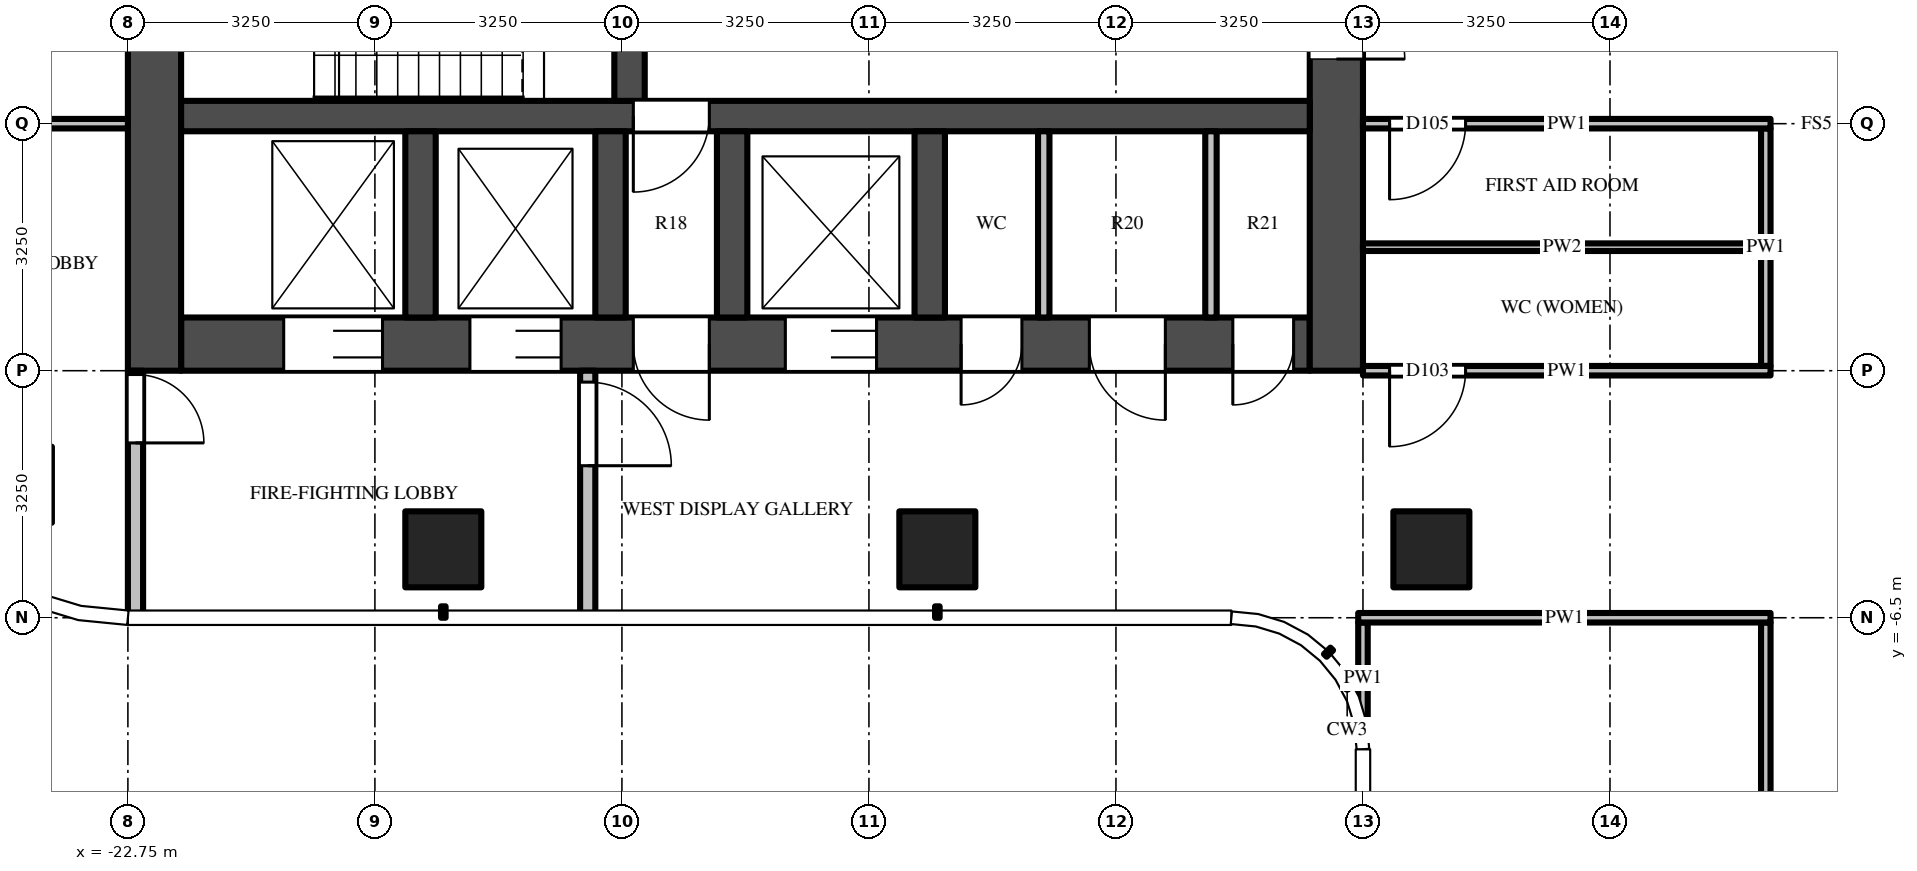
"""IFC4 building model, lengths in metres.
Left out: names, types, materials, properties, quantities, classifications, styles, units other than length and angle.
Written with IfcOpenShell. Run it as: python <this file> out.ifc"""

import sys

from ifc_helpers import new_model, si_unit, direction, frame, frame_2d, origin, origin_2d, place, context, subcontext, project, spatial, rectangle, extrude, source, transform, mapped, element, fill, save


model = new_model("IFC4")
c1 = context("Model", 3, precision=1e-05, world=origin(), true_north=direction((0.0, 1.0)))
c2 = subcontext(c1, "Body", "Model", "MODEL_VIEW")
j1 = project(units=[si_unit("LENGTHUNIT", "METRE"), si_unit("PLANEANGLEUNIT", "RADIAN")], contexts=[c1])
p1 = place(None, origin())
s1 = spatial("IfcSite", under=j1, at=p1, CompositionType="ELEMENT")
p2 = place(p1, origin())
s2 = spatial("IfcBuilding", under=s1, at=p2, CompositionType="ELEMENT")
p3 = place(p2, frame((0.0, 0.0, 291.1)))
s3 = spatial("IfcBuildingStorey", under=s2, at=p3, CompositionType="ELEMENT", Elevation=291.1)
m1 = source(origin(), c2, "Body", "SweptSolid", [
    extrude(rectangle(XDim=1.0, YDim=1.0, at=origin_2d()), origin(), (0.0, 0.0, 1.0), 3.9),
])
for number, where, z_axis, x_axis in (
    (1, (-5.6, -5.6, 0.0), (0.0, 0.0, 1.0), (1.0, 0.0, 0.0)),
    (2, (-12.1, -5.6, 0.0), (0.0, 0.0, 1.0), (1.0, 0.0, 0.0)),
    (3, (-18.6, -5.6, 0.0), (0.0, 0.0, 1.0), (1.0, 0.0, 0.0)),
):
    element("IfcColumn", number, at=place(p3, frame(where, z_axis=z_axis, x_axis=x_axis)), inside=s3, PredefinedType="COLUMN", context=c2, shape_type="MappedRepresentation", body=[
        mapped(m1, transform((0.0, 0.0, 0.0))),
    ])
m2 = source(origin(), c2, "Body", "SweptSolid", [
    extrude(rectangle(XDim=14.85, YDim=0.7, at=frame_2d((7.425, 0.0))), origin(), (0.0, 0.0, 1.0), 3.7),
])
p4 = place(p3, frame((-7.2, -2.9, 0.0), z_axis=(0.0, 0.0, 1.0), x_axis=(-1.0, 0.0, 0.0)))
e4 = element("IfcWall", 4, at=p4, inside=s3, PredefinedType="SHEAR", context=c2, shape_type="MappedRepresentation", body=[
    mapped(m2, transform((0.0, 0.0, 0.0))),
])
m3 = source(origin(), c2, "Body", "SweptSolid", [
    extrude(rectangle(XDim=1.2, YDim=2.1, at=frame_2d((0.6, 1.05))), frame((0.0, 0.36, 0.0), z_axis=(0.0, -1.0, 0.0), x_axis=(1.0, 0.0, 0.0)), (0.0, 0.0, 1.0), 0.72),
])
p5 = place(p4, frame((5.7, 0.0, 0.0)))
e5 = element("IfcOpeningElement", 5, at=p5, cuts=e4, PredefinedType="OPENING", context=c2, shape_type="MappedRepresentation", body=[
    mapped(m3, transform((0.0, 0.0, 0.0))),
])
m4 = source(origin(), c2, "Body", "SweptSolid", [
    extrude(rectangle(XDim=1.3, YDim=2.1, at=frame_2d((0.65, 1.05))), frame((0.0, 0.36, 0.0), z_axis=(0.0, -1.0, 0.0), x_axis=(1.0, 0.0, 0.0)), (0.0, 0.0, 1.0), 0.72),
])
p6 = place(p4, frame((12.2, 0.0, 0.0)))
e6 = element("IfcOpeningElement", 6, at=p6, cuts=e4, PredefinedType="OPENING", context=c2, shape_type="MappedRepresentation", body=[
    mapped(m4, transform((0.0, 0.0, 0.0))),
])
p7 = place(p4, frame((9.85, 0.0, 0.0)))
e7 = element("IfcOpeningElement", 7, at=p7, cuts=e4, PredefinedType="OPENING", context=c2, shape_type="MappedRepresentation", body=[
    mapped(m3, transform((0.0, 0.0, 0.0))),
])
m5 = source(origin(), c2, "Body", "SweptSolid", [
    extrude(rectangle(XDim=1.0, YDim=2.1, at=frame_2d((0.5, 1.05))), frame((0.0, 0.36, 0.0), z_axis=(0.0, -1.0, 0.0), x_axis=(1.0, 0.0, 0.0)), (0.0, 0.0, 1.0), 0.72),
])
p8 = place(p4, frame((7.9, 0.0, 0.0)))
e8 = element("IfcOpeningElement", 8, at=p8, cuts=e4, PredefinedType="OPENING", context=c2, shape_type="MappedRepresentation", body=[
    mapped(m5, transform((0.0, 0.0, 0.0))),
])
m6 = source(origin(), c2, "Body", "SweptSolid", [
    extrude(rectangle(XDim=0.8, YDim=2.1, at=frame_2d((0.4, 1.05))), frame((0.0, 0.36, 0.0), z_axis=(0.0, -1.0, 0.0), x_axis=(1.0, 0.0, 0.0)), (0.0, 0.0, 1.0), 0.72),
])
p9 = place(p4, frame((0.212, 0.0, 0.0)))
e9 = element("IfcOpeningElement", 9, at=p9, cuts=e4, PredefinedType="OPENING", context=c2, shape_type="MappedRepresentation", body=[
    mapped(m6, transform((0.0, 0.0, 0.0))),
])
p10 = place(p4, frame((1.9, 0.0, 0.0)))
e10 = element("IfcOpeningElement", 10, at=p10, cuts=e4, PredefinedType="OPENING", context=c2, shape_type="MappedRepresentation", body=[
    mapped(m5, transform((0.0, 0.0, 0.0))),
])
p11 = place(p4, frame((3.788, 0.0, 0.0)))
e11 = element("IfcOpeningElement", 11, at=p11, cuts=e4, PredefinedType="OPENING", context=c2, shape_type="MappedRepresentation", body=[
    mapped(m6, transform((0.0, 0.0, 0.0))),
])
m7 = source(origin(), c2, "Body", "SweptSolid", [
    extrude(rectangle(XDim=9.05, YDim=0.7, at=frame_2d((4.525, 0.0))), origin(), (0.0, 0.0, 1.0), 3.7),
])
p12 = place(p3, frame((-6.85, 5.8, 0.0), z_axis=(0.0, 0.0, 1.0), x_axis=(0.0, -1.0, 0.0)))
e12 = element("IfcWall", 12, at=p12, inside=s3, PredefinedType="SHEAR", context=c2, shape_type="MappedRepresentation", body=[
    mapped(m7, transform((0.0, 0.0, 0.0))),
])
m8 = source(origin(), c2, "Body", "SweptSolid", [
    extrude(rectangle(XDim=1.8, YDim=2.1, at=frame_2d((0.9, 1.05))), frame((0.0, 0.36, 0.0), z_axis=(0.0, -1.0, 0.0), x_axis=(1.0, 0.0, 0.0)), (0.0, 0.0, 1.0), 0.72),
])
p13 = place(p12, frame((3.15, 0.0, 0.0)))
e13 = element("IfcOpeningElement", 13, at=p13, cuts=e12, PredefinedType="OPENING", context=c2, shape_type="MappedRepresentation", body=[
    mapped(m8, transform((0.0, 0.0, 0.0))),
])
p14 = place(p3, frame((-22.4, 5.8, 0.0), z_axis=(0.0, 0.0, 1.0), x_axis=(0.0, -1.0, 0.0)))
e14 = element("IfcWall", 14, at=p14, inside=s3, PredefinedType="SHEAR", context=c2, shape_type="MappedRepresentation", body=[
    mapped(m7, transform((0.0, 0.0, 0.0))),
])
m9 = source(origin(), c2, "Body", "SweptSolid", [
    extrude(rectangle(XDim=14.85, YDim=0.4, at=frame_2d((7.425, 0.0))), origin(), (0.0, 0.0, 1.0), 3.7),
])
p15 = place(p3, frame((-7.2, 0.1, 0.0), z_axis=(0.0, 0.0, 1.0), x_axis=(-1.0, 0.0, 0.0)))
e15 = element("IfcWall", 15, at=p15, inside=s3, PredefinedType="SHEAR", context=c2, shape_type="MappedRepresentation", body=[
    mapped(m9, transform((0.0, 0.0, 0.0))),
])
m10 = source(origin(), c2, "Body", "SweptSolid", [
    extrude(rectangle(XDim=1.0, YDim=2.1, at=frame_2d((0.5, 1.05))), frame((0.0, 0.21, 0.0), z_axis=(0.0, -1.0, 0.0), x_axis=(1.0, 0.0, 0.0)), (0.0, 0.0, 1.0), 0.42),
])
p16 = place(p15, frame((7.9, 0.0, 0.0)))
e16 = element("IfcOpeningElement", 16, at=p16, cuts=e15, PredefinedType="OPENING", context=c2, shape_type="MappedRepresentation", body=[
    mapped(m10, transform((0.0, 0.0, 0.0))),
])
m11 = source(origin(), c2, "Body", "SweptSolid", [
    extrude(rectangle(XDim=5.5, YDim=0.4, at=frame_2d((2.75, 0.0))), origin(), (0.0, 0.0, 1.0), 3.7),
])
p17 = place(p3, frame((-16.15, 5.8, 0.0), z_axis=(0.0, 0.0, 1.0), x_axis=(0.0, -1.0, 0.0)))
e17 = element("IfcWall", 17, at=p17, inside=s3, PredefinedType="SHEAR", context=c2, shape_type="MappedRepresentation", body=[
    mapped(m11, transform((0.0, 0.0, 0.0))),
])
m12 = source(origin(), c2, "Body", "SweptSolid", [
    extrude(rectangle(XDim=1.1, YDim=2.1, at=frame_2d((0.55, 1.05))), frame((0.0, 0.21, 0.0), z_axis=(0.0, -1.0, 0.0), x_axis=(1.0, 0.0, 0.0)), (0.0, 0.0, 1.0), 0.42),
])
p18 = place(p17, frame((0.725, 0.0, 0.0)))
e18 = element("IfcOpeningElement", 18, at=p18, cuts=e17, PredefinedType="OPENING", context=c2, shape_type="MappedRepresentation", body=[
    mapped(m12, transform((0.0, 0.0, 0.0))),
])
p19 = place(p17, frame((3.675, 0.0, 0.0)))
e19 = element("IfcOpeningElement", 19, at=p19, cuts=e17, PredefinedType="OPENING", context=c2, shape_type="MappedRepresentation", body=[
    mapped(m12, transform((0.0, 0.0, 0.0))),
])
m13 = source(origin(), c2, "Body", "SweptSolid", [
    extrude(rectangle(XDim=2.45, YDim=0.4, at=frame_2d((1.225, 0.0))), origin(), (0.0, 0.0, 1.0), 3.7),
])
for number, where, z_axis, x_axis in (
    (20, (-12.2, -0.1, 0.0), (0.0, 0.0, 1.0), (0.0, -1.0, 0.0)),
    (21, (-14.8, -0.1, 0.0), (0.0, 0.0, 1.0), (0.0, -1.0, 0.0)),
    (22, (-16.4, -0.1, 0.0), (0.0, 0.0, 1.0), (0.0, -1.0, 0.0)),
    (23, (-18.9, -0.1, 0.0), (0.0, 0.0, 1.0), (0.0, -1.0, 0.0)),
):
    element("IfcWall", number, at=place(p3, frame(where, z_axis=z_axis, x_axis=x_axis)), inside=s3, PredefinedType="SHEAR", context=c2, shape_type="MappedRepresentation", body=[
        mapped(m13, transform((0.0, 0.0, 0.0))),
    ])
m14 = source(origin(), c2, "Body", "SweptSolid", [
    extrude(rectangle(XDim=3.25, YDim=0.2, at=frame_2d((1.625, 0.0))), origin(), (0.0, 0.0, 1.0), 3.7),
])
p20 = place(p3, frame((-16.7, -3.25, 0.0), z_axis=(0.0, 0.0, 1.0), x_axis=(0.0, -1.0, 0.0)))
e24 = element("IfcWall", 24, at=p20, inside=s3, PredefinedType="PARTITIONING", context=c2, shape_type="MappedRepresentation", body=[
    mapped(m14, transform((0.0, 0.0, 0.0))),
])
m15 = source(origin(), c2, "Body", "SweptSolid", [
    extrude(rectangle(XDim=1.1, YDim=2.1, at=frame_2d((0.55, 1.05))), frame((0.0, 0.11, 0.0), z_axis=(0.0, -1.0, 0.0), x_axis=(1.0, 0.0, 0.0)), (0.0, 0.0, 1.0), 0.22),
])
p21 = place(p20, frame((0.15, 0.0, 0.0)))
e25 = element("IfcOpeningElement", 25, at=p21, cuts=e24, PredefinedType="OPENING", context=c2, shape_type="MappedRepresentation", body=[
    mapped(m15, transform((0.0, 0.0, 0.0))),
])
p22 = place(p3, frame((-22.65, -3.25, 0.0), z_axis=(0.0, 0.0, 1.0), x_axis=(0.0, -1.0, 0.0)))
e26 = element("IfcWall", 26, at=p22, inside=s3, PredefinedType="PARTITIONING", context=c2, shape_type="MappedRepresentation", body=[
    mapped(m14, transform((0.0, 0.0, 0.0))),
])
m16 = source(origin(), c2, "Body", "SweptSolid", [
    extrude(rectangle(XDim=0.9, YDim=2.1, at=frame_2d((0.45, 1.05))), frame((0.0, 0.11, 0.0), z_axis=(0.0, -1.0, 0.0), x_axis=(1.0, 0.0, 0.0)), (0.0, 0.0, 1.0), 0.22),
])
p23 = place(p22, frame((0.05, 0.0, 0.0)))
e27 = element("IfcOpeningElement", 27, at=p23, cuts=e26, PredefinedType="OPENING", context=c2, shape_type="MappedRepresentation", body=[
    mapped(m16, transform((0.0, 0.0, 0.0))),
])
m17 = source(origin(), c2, "Body", "SweptSolid", [
    extrude(rectangle(XDim=2.45, YDim=0.15, at=frame_2d((1.225, 0.0))), origin(), (0.0, 0.0, 1.0), 3.7),
])
for number, where, z_axis, x_axis in (
    (28, (-8.5, -0.1, 0.0), (0.0, 0.0, 1.0), (0.0, -1.0, 0.0)),
    (29, (-10.7, -0.1, 0.0), (0.0, 0.0, 1.0), (0.0, -1.0, 0.0)),
):
    element("IfcWall", number, at=place(p3, frame(where, z_axis=z_axis, x_axis=x_axis)), inside=s3, PredefinedType="PARTITIONING", context=c2, shape_type="MappedRepresentation", body=[
        mapped(m17, transform((0.0, 0.0, 0.0))),
    ])
m18 = source(origin(), c2, "Body", "SweptSolid", [
    extrude(rectangle(XDim=1.469, YDim=0.125, at=frame_2d((0.734, 0.0))), origin(), (0.0, 0.0, 1.0), 3.7),
])
p24 = place(p3, frame((-6.5, -6.562, 0.0), z_axis=(0.0, 0.0, 1.0), x_axis=(0.0, -1.0, 0.0)))
e30 = element("IfcWall", 30, at=p24, inside=s3, PredefinedType="PARTITIONING", context=c2, shape_type="MappedRepresentation", body=[
    mapped(m18, transform((0.0, 0.0, 0.0))),
])
m19 = source(origin(), c2, "Body", "SweptSolid", [
    extrude(rectangle(XDim=5.475, YDim=0.125, at=frame_2d((2.738, 0.0))), origin(), (0.0, 0.0, 1.0), 2.997),
])
p25 = place(p3, frame((-1.2, -6.562, 0.0), z_axis=(0.0, 0.0, 1.0), x_axis=(0.0, -1.0, 0.0)))
e31 = element("IfcWall", 31, at=p25, inside=s3, PredefinedType="PARTITIONING", context=c2, shape_type="MappedRepresentation", body=[
    mapped(m19, transform((0.0, 0.0, 0.0))),
])
m20 = source(origin(), c2, "Body", "SweptSolid", [
    extrude(rectangle(XDim=1.2, YDim=2.1, at=frame_2d((0.6, 1.05))), frame((0.0, 0.073, 0.0), z_axis=(0.0, -1.0, 0.0), x_axis=(1.0, 0.0, 0.0)), (0.0, 0.0, 1.0), 0.145),
])
p26 = place(p25, frame((3.988, 0.0, 0.0)))
e32 = element("IfcOpeningElement", 32, at=p26, cuts=e31, PredefinedType="OPENING", context=c2, shape_type="MappedRepresentation", body=[
    mapped(m20, transform((0.0, 0.0, 0.0))),
])
m21 = source(origin(), c2, "Body", "SweptSolid", [
    extrude(rectangle(XDim=3.125, YDim=0.125, at=frame_2d((1.562, 0.0))), origin(), (0.0, 0.0, 1.0), 3.068),
])
p27 = place(p3, frame((-1.2, -0.062, 0.0), z_axis=(0.0, 0.0, 1.0), x_axis=(0.0, -1.0, 0.0)))
e33 = element("IfcWall", 33, at=p27, inside=s3, PredefinedType="PARTITIONING", context=c2, shape_type="MappedRepresentation", body=[
    mapped(m21, transform((0.0, 0.0, 0.0))),
])
m22 = source(origin(), c2, "Body", "SweptSolid", [
    extrude(rectangle(XDim=5.425, YDim=0.125, at=frame_2d((2.712, 0.0))), origin(), (0.0, 0.0, 1.0), 2.78),
])
p28 = place(p3, frame((-1.137, -6.5, 0.0), z_axis=(0.0, 0.0, 1.0), x_axis=(-1.0, 0.0, 0.0)))
e34 = element("IfcWall", 34, at=p28, inside=s3, PredefinedType="PARTITIONING", context=c2, shape_type="MappedRepresentation", body=[
    mapped(m22, transform((0.0, 0.0, 0.0))),
])
m23 = source(origin(), c2, "Body", "SweptSolid", [
    extrude(rectangle(XDim=5.363, YDim=0.125, at=frame_2d((2.681, 0.0))), origin(), (0.0, 0.0, 1.0), 2.997),
])
p29 = place(p3, frame((-1.137, -3.25, 0.0), z_axis=(0.0, 0.0, 1.0), x_axis=(-1.0, 0.0, 0.0)))
e35 = element("IfcWall", 35, at=p29, inside=s3, PredefinedType="PARTITIONING", context=c2, shape_type="MappedRepresentation", body=[
    mapped(m23, transform((0.0, 0.0, 0.0))),
])
m24 = source(origin(), c2, "Body", "SweptSolid", [
    extrude(rectangle(XDim=1.0, YDim=2.1, at=frame_2d((0.5, 1.05))), frame((0.0, 0.073, 0.0), z_axis=(0.0, -1.0, 0.0), x_axis=(1.0, 0.0, 0.0)), (0.0, 0.0, 1.0), 0.145),
])
p30 = place(p29, frame((4.012, 0.0, 0.0)))
e36 = element("IfcOpeningElement", 36, at=p30, cuts=e35, PredefinedType="OPENING", context=c2, shape_type="MappedRepresentation", body=[
    mapped(m24, transform((0.0, 0.0, 0.0))),
])
m25 = source(origin(), c2, "Body", "SweptSolid", [
    extrude(rectangle(XDim=5.238, YDim=0.1, at=frame_2d((2.619, 0.0))), origin(), (0.0, 0.0, 1.0), 2.997),
])
p31 = place(p3, frame((-6.5, -1.625, 0.0), z_axis=(0.0, 0.0, 1.0), x_axis=(1.0, 0.0, 0.0)))
e37 = element("IfcWall", 37, at=p31, inside=s3, PredefinedType="PARTITIONING", context=c2, shape_type="MappedRepresentation", body=[
    mapped(m25, transform((0.0, 0.0, 0.0))),
])
p32 = place(p3, frame((-1.137, 0.0, 0.0), z_axis=(0.0, 0.0, 1.0), x_axis=(-1.0, 0.0, 0.0)))
e38 = element("IfcWall", 38, at=p32, inside=s3, PredefinedType="PARTITIONING", context=c2, shape_type="MappedRepresentation", body=[
    mapped(m23, transform((0.0, 0.0, 0.0))),
])
p33 = place(p32, frame((4.012, 0.0, 0.0)))
e39 = element("IfcOpeningElement", 39, at=p33, cuts=e38, PredefinedType="OPENING", context=c2, shape_type="MappedRepresentation", body=[
    mapped(m24, transform((0.0, 0.0, 0.0))),
])
m26 = source(origin(), c2, "Body", "SweptSolid", [
    extrude(rectangle(XDim=3.05, YDim=0.125, at=frame_2d((1.525, 0.0))), origin(), (0.0, 0.0, 1.0), 2.78),
])
p34 = place(p3, frame((-25.8, 0.0, 0.0), z_axis=(0.0, 0.0, 1.0), x_axis=(1.0, 0.0, 0.0)))
e40 = element("IfcWall", 40, at=p34, inside=s3, PredefinedType="PARTITIONING", context=c2, shape_type="MappedRepresentation", body=[
    mapped(m26, transform((0.0, 0.0, 0.0))),
])
p35 = place(p34, frame((0.15, 0.0, 0.0)))
e41 = element("IfcOpeningElement", 41, at=p35, cuts=e40, PredefinedType="OPENING", context=c2, shape_type="MappedRepresentation", body=[
    mapped(m24, transform((0.0, 0.0, 0.0))),
])
m27 = source(origin(), c2, "Body", "SweptSolid", [
    extrude(rectangle(XDim=1.2, YDim=2.1, at=frame_2d((0.6, 1.05))), frame((0.0, -0.275, 0.0), z_axis=(0.0, -1.0, 0.0), x_axis=(1.0, 0.0, 0.0)), (0.0, 0.0, 1.0), 0.05),
])
p36 = place(p5, origin())
e42 = element("IfcDoor", 42, at=p36, inside=s3, OperationType="DOUBLE_DOOR_SLIDING", PredefinedType="DOOR", context=c2, shape_type="MappedRepresentation", body=[
    mapped(m27, transform((0.0, 0.0, 0.0))),
])
fill(e5, e42)
m28 = source(origin(), c2, "Body", "SweptSolid", [
    extrude(rectangle(XDim=1.3, YDim=2.1, at=frame_2d((0.65, 1.05))), frame((0.0, -0.275, 0.0), z_axis=(0.0, -1.0, 0.0), x_axis=(1.0, 0.0, 0.0)), (0.0, 0.0, 1.0), 0.05),
])
p37 = place(p6, origin())
e43 = element("IfcDoor", 43, at=p37, inside=s3, OperationType="DOUBLE_DOOR_SLIDING", PredefinedType="DOOR", context=c2, shape_type="MappedRepresentation", body=[
    mapped(m28, transform((0.0, 0.0, 0.0))),
])
fill(e6, e43)
p38 = place(p7, origin())
e44 = element("IfcDoor", 44, at=p38, inside=s3, OperationType="DOUBLE_DOOR_SLIDING", PredefinedType="DOOR", context=c2, shape_type="MappedRepresentation", body=[
    mapped(m27, transform((0.0, 0.0, 0.0))),
])
fill(e7, e44)
m29 = source(origin(), c2, "Body", "SweptSolid", [
    extrude(rectangle(XDim=1.8, YDim=2.1, at=frame_2d((0.9, 1.05))), frame((0.0, -0.275, 0.0), z_axis=(0.0, -1.0, 0.0), x_axis=(1.0, 0.0, 0.0)), (0.0, 0.0, 1.0), 0.05),
])
p39 = place(p13, origin())
e45 = element("IfcDoor", 45, at=p39, inside=s3, OperationType="DOUBLE_DOOR_SINGLE_SWING", PredefinedType="DOOR", context=c2, shape_type="MappedRepresentation", body=[
    mapped(m29, transform((0.0, 0.0, 0.0))),
])
fill(e13, e45)
m30 = source(origin(), c2, "Body", "SweptSolid", [
    extrude(rectangle(XDim=1.0, YDim=2.1, at=frame_2d((0.5, 1.05))), frame((0.0, 0.025, 0.0), z_axis=(0.0, -1.0, 0.0), x_axis=(1.0, 0.0, 0.0)), (0.0, 0.0, 1.0), 0.05),
])
p40 = place(p16, origin())
e46 = element("IfcDoor", 46, at=p40, inside=s3, OperationType="SINGLE_SWING_RIGHT", PredefinedType="DOOR", context=c2, shape_type="MappedRepresentation", body=[
    mapped(m30, transform((0.0, 0.0, 0.0))),
])
fill(e16, e46)
m31 = source(origin(), c2, "Body", "SweptSolid", [
    extrude(rectangle(XDim=1.0, YDim=2.1, at=frame_2d((0.5, 1.05))), frame((0.0, -0.275, 0.0), z_axis=(0.0, -1.0, 0.0), x_axis=(1.0, 0.0, 0.0)), (0.0, 0.0, 1.0), 0.05),
])
p41 = place(p8, origin())
e47 = element("IfcDoor", 47, at=p41, inside=s3, OperationType="SINGLE_SWING_LEFT", PredefinedType="DOOR", context=c2, shape_type="MappedRepresentation", body=[
    mapped(m31, transform((0.0, 0.0, 0.0))),
])
fill(e8, e47)
m32 = source(origin(), c2, "Body", "SweptSolid", [
    extrude(rectangle(XDim=1.1, YDim=2.1, at=frame_2d((0.55, 1.05))), frame((0.0, 0.025, 0.0), z_axis=(0.0, -1.0, 0.0), x_axis=(1.0, 0.0, 0.0)), (0.0, 0.0, 1.0), 0.05),
])
p42 = place(p21, origin())
e48 = element("IfcDoor", 48, at=p42, inside=s3, OperationType="SINGLE_SWING_RIGHT", PredefinedType="DOOR", context=c2, shape_type="MappedRepresentation", body=[
    mapped(m32, transform((0.0, 0.0, 0.0))),
])
fill(e25, e48)
m33 = source(origin(), c2, "Body", "SweptSolid", [
    extrude(rectangle(XDim=0.9, YDim=2.1, at=frame_2d((0.45, 1.05))), frame((0.0, 0.025, 0.0), z_axis=(0.0, -1.0, 0.0), x_axis=(1.0, 0.0, 0.0)), (0.0, 0.0, 1.0), 0.05),
])
p43 = place(p23, origin())
e49 = element("IfcDoor", 49, at=p43, inside=s3, OperationType="SINGLE_SWING_RIGHT", PredefinedType="DOOR", context=c2, shape_type="MappedRepresentation", body=[
    mapped(m33, transform((0.0, 0.0, 0.0))),
])
fill(e27, e49)
m34 = source(origin(), c2, "Body", "SweptSolid", [
    extrude(rectangle(XDim=0.8, YDim=2.1, at=frame_2d((0.4, 1.05))), frame((0.0, -0.275, 0.0), z_axis=(0.0, -1.0, 0.0), x_axis=(1.0, 0.0, 0.0)), (0.0, 0.0, 1.0), 0.05),
])
p44 = place(p9, origin())
e50 = element("IfcDoor", 50, at=p44, inside=s3, OperationType="SINGLE_SWING_RIGHT", PredefinedType="DOOR", context=c2, shape_type="MappedRepresentation", body=[
    mapped(m34, transform((0.0, 0.0, 0.0))),
])
fill(e9, e50)
p45 = place(p10, origin())
e51 = element("IfcDoor", 51, at=p45, inside=s3, OperationType="SINGLE_SWING_LEFT", PredefinedType="DOOR", context=c2, shape_type="MappedRepresentation", body=[
    mapped(m31, transform((0.0, 0.0, 0.0))),
])
fill(e10, e51)
p46 = place(p11, origin())
e52 = element("IfcDoor", 52, at=p46, inside=s3, OperationType="SINGLE_SWING_RIGHT", PredefinedType="DOOR", context=c2, shape_type="MappedRepresentation", body=[
    mapped(m34, transform((0.0, 0.0, 0.0))),
])
fill(e11, e52)
p47 = place(p30, origin())
e53 = element("IfcDoor", 53, at=p47, inside=s3, OperationType="SINGLE_SWING_RIGHT", PredefinedType="DOOR", context=c2, shape_type="MappedRepresentation", body=[
    mapped(m30, transform((0.0, 0.0, 0.0))),
])
fill(e36, e53)
p48 = place(p33, origin())
e54 = element("IfcDoor", 54, at=p48, inside=s3, OperationType="SINGLE_SWING_RIGHT", PredefinedType="DOOR", context=c2, shape_type="MappedRepresentation", body=[
    mapped(m30, transform((0.0, 0.0, 0.0))),
])
fill(e39, e54)
save(model, sys.argv[1])
